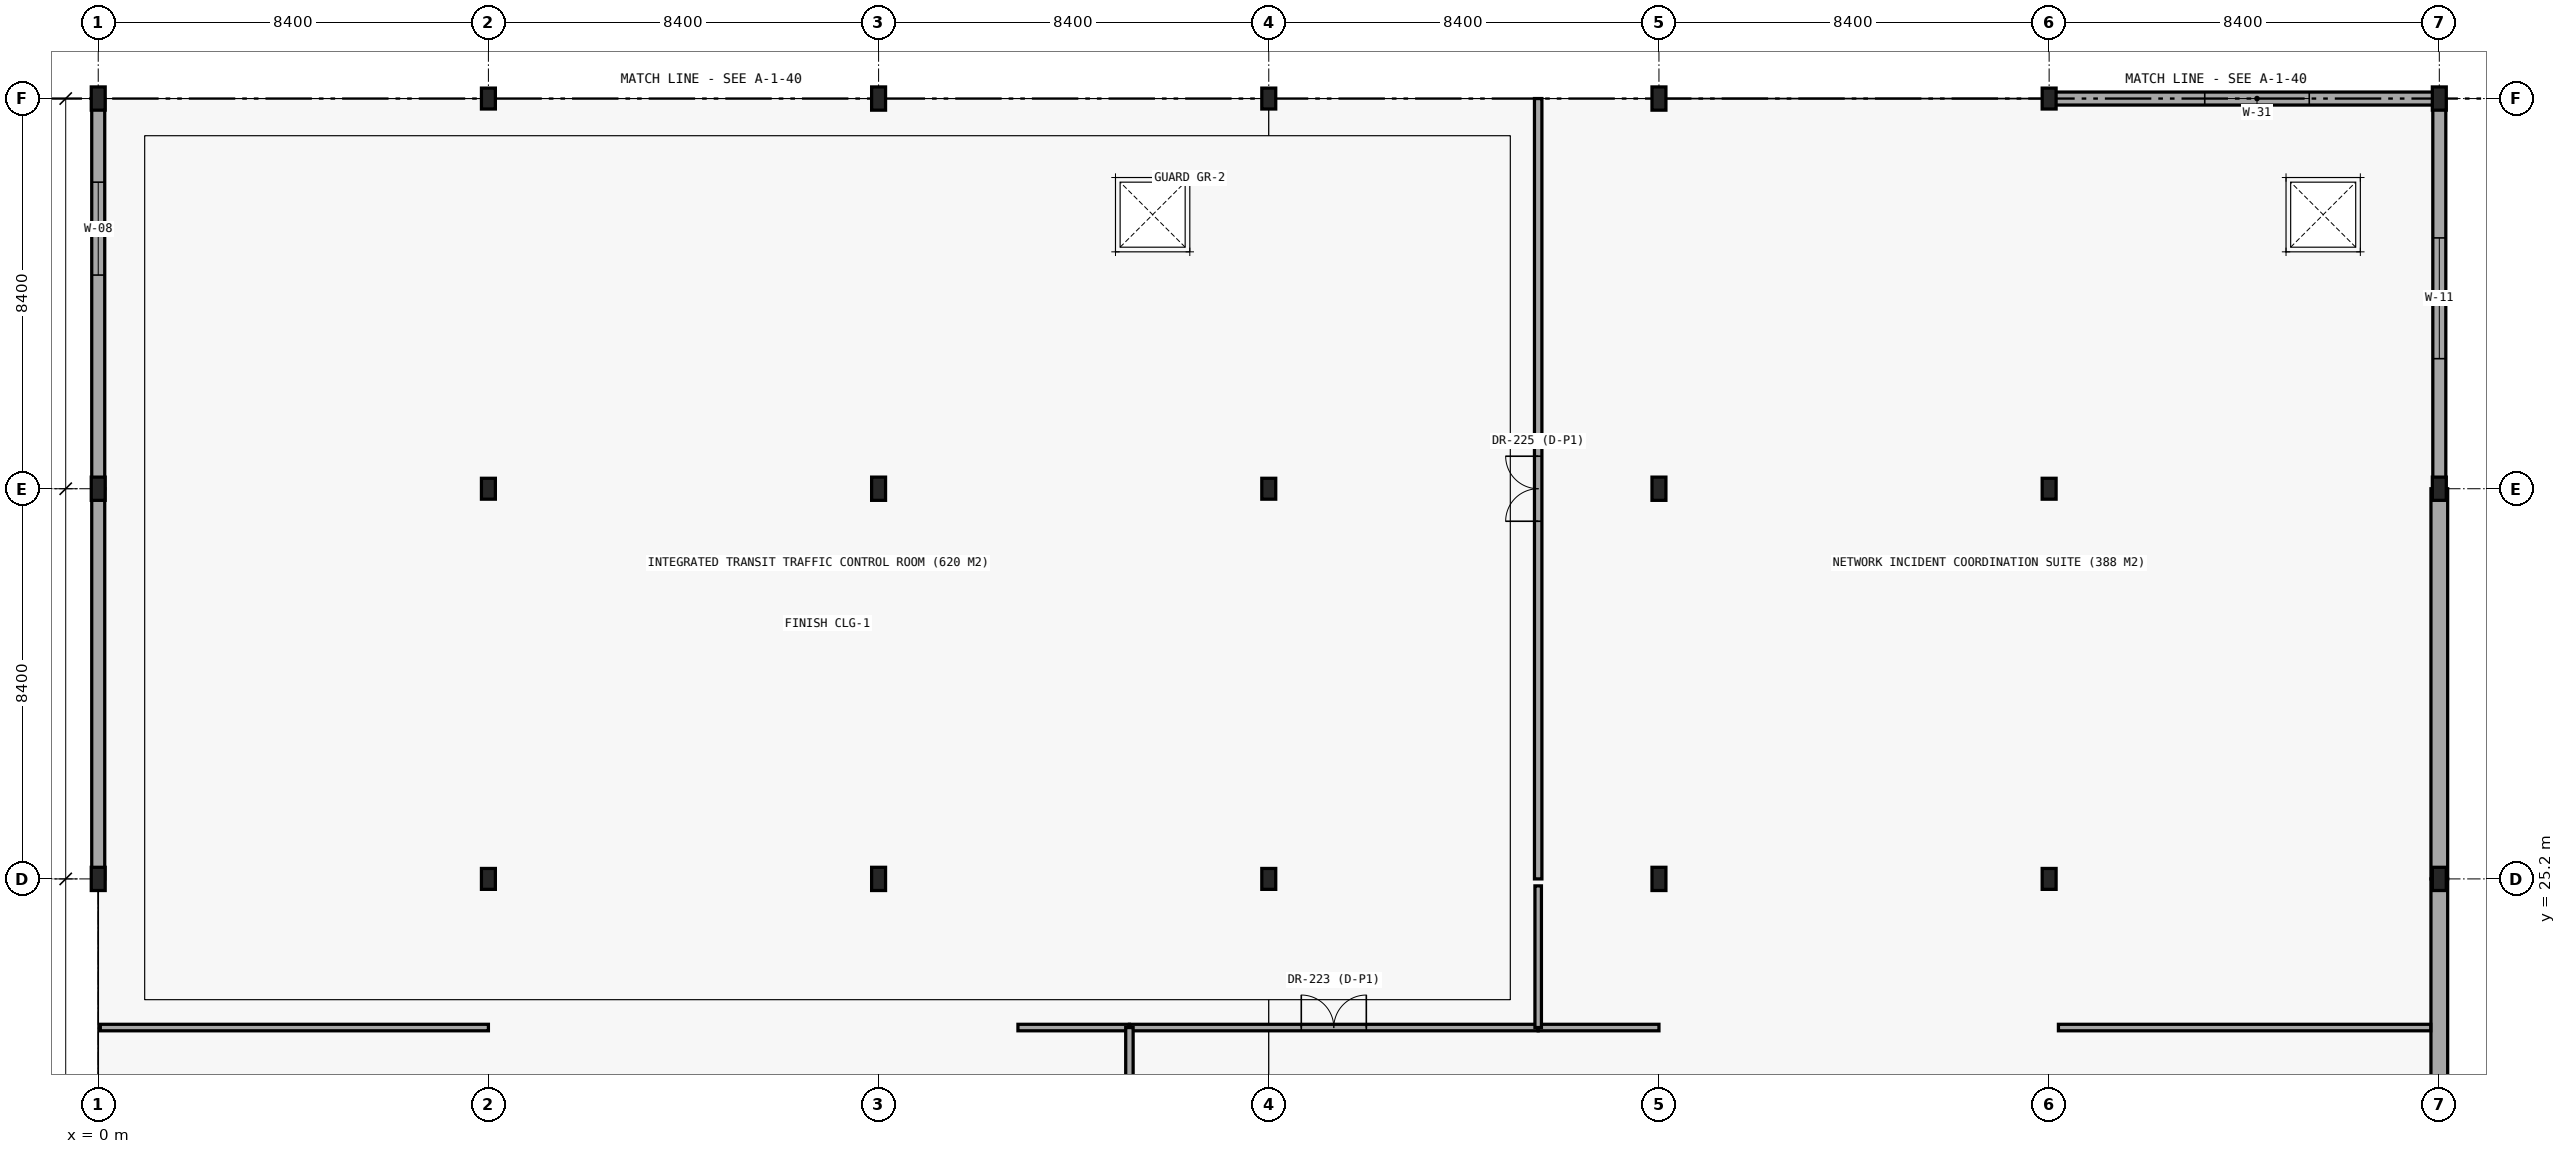
"""IFC4 building model, lengths in metres.
Left out: names, types, materials, properties, quantities, classifications, styles, units other than length and angle.
Written with IfcOpenShell. Run it as: python <this file> out.ifc"""

import sys

from ifc_helpers import new_model, si_unit, direction, frame, frame_2d, origin, origin_2d, place, context, subcontext, project, spatial, rectangle, i_section, extrude, element, fill, save


model = new_model("IFC4")
c1 = context("Model", 3, precision=1e-05, world=origin(), true_north=direction((0.0, 1.0)))
c2 = subcontext(c1, "Body", "Model", "MODEL_VIEW")
j1 = project(units=[si_unit("LENGTHUNIT", "METRE"), si_unit("PLANEANGLEUNIT", "RADIAN")], contexts=[c1])
p1 = place(None, origin())
s1 = spatial("IfcSite", under=j1, at=p1, CompositionType="ELEMENT")
p2 = place(p1, origin())
s2 = spatial("IfcBuilding", under=s1, at=p2, CompositionType="ELEMENT")
p3 = place(p2, frame((0.0, 0.0, 13.2)))
s3 = spatial("IfcBuildingStorey", under=s2, at=p3, CompositionType="ELEMENT", Elevation=13.2)
for number, where, z_axis, x_axis in (
    (1, (0.0, 25.2, 0.0), (0.0, 0.0, 1.0), (1.0, 0.0, 0.0)),
    (2, (0.0, 33.6, 0.0), (0.0, 0.0, 1.0), (1.0, 0.0, 0.0)),
    (3, (0.0, 42.0, 0.0), (0.0, 0.0, 1.0), (1.0, 0.0, 0.0)),
):
    element("IfcColumn", number, at=place(p3, frame(where, z_axis=z_axis, x_axis=x_axis)), inside=s3, PredefinedType="COLUMN", context=c2, shape_type="SweptSolid", body=[
        extrude(i_section(OverallWidth=0.3, OverallDepth=0.5, WebThickness=0.014, FlangeThickness=0.028, FilletRadius=0.027, at=origin_2d()), origin(), (0.0, 0.0, 1.0), 4.2),
    ])
for number, where, z_axis, x_axis in (
    (4, (8.4, 25.2, 0.0), (0.0, 0.0, 1.0), (1.0, 0.0, 0.0)),
    (5, (8.4, 33.6, 0.0), (0.0, 0.0, 1.0), (1.0, 0.0, 0.0)),
    (6, (8.4, 42.0, 0.0), (0.0, 0.0, 1.0), (1.0, 0.0, 0.0)),
):
    element("IfcColumn", number, at=place(p3, frame(where, z_axis=z_axis, x_axis=x_axis)), inside=s3, PredefinedType="COLUMN", context=c2, shape_type="SweptSolid", body=[
        extrude(i_section(OverallWidth=0.3, OverallDepth=0.45, WebThickness=0.014, FlangeThickness=0.026, FilletRadius=0.027, at=origin_2d()), origin(), (0.0, 0.0, 1.0), 4.2),
    ])
for number, where, z_axis, x_axis in (
    (7, (16.8, 25.2, 0.0), (0.0, 0.0, 1.0), (1.0, 0.0, 0.0)),
    (8, (16.8, 33.6, 0.0), (0.0, 0.0, 1.0), (1.0, 0.0, 0.0)),
    (9, (16.8, 42.0, 0.0), (0.0, 0.0, 1.0), (1.0, 0.0, 0.0)),
):
    element("IfcColumn", number, at=place(p3, frame(where, z_axis=z_axis, x_axis=x_axis)), inside=s3, PredefinedType="COLUMN", context=c2, shape_type="SweptSolid", body=[
        extrude(i_section(OverallWidth=0.3, OverallDepth=0.5, WebThickness=0.014, FlangeThickness=0.028, FilletRadius=0.027, at=origin_2d()), origin(), (0.0, 0.0, 1.0), 4.2),
    ])
for number, where, z_axis, x_axis in (
    (10, (25.2, 25.2, 0.0), (0.0, 0.0, 1.0), (1.0, 0.0, 0.0)),
    (11, (25.2, 33.6, 0.0), (0.0, 0.0, 1.0), (1.0, 0.0, 0.0)),
    (12, (25.2, 42.0, 0.0), (0.0, 0.0, 1.0), (1.0, 0.0, 0.0)),
):
    element("IfcColumn", number, at=place(p3, frame(where, z_axis=z_axis, x_axis=x_axis)), inside=s3, PredefinedType="COLUMN", context=c2, shape_type="SweptSolid", body=[
        extrude(i_section(OverallWidth=0.3, OverallDepth=0.45, WebThickness=0.014, FlangeThickness=0.026, FilletRadius=0.027, at=origin_2d()), origin(), (0.0, 0.0, 1.0), 4.2),
    ])
for number, where, z_axis, x_axis in (
    (13, (33.6, 25.2, 0.0), (0.0, 0.0, 1.0), (1.0, 0.0, 0.0)),
    (14, (33.6, 33.6, 0.0), (0.0, 0.0, 1.0), (1.0, 0.0, 0.0)),
    (15, (33.6, 42.0, 0.0), (0.0, 0.0, 1.0), (1.0, 0.0, 0.0)),
):
    element("IfcColumn", number, at=place(p3, frame(where, z_axis=z_axis, x_axis=x_axis)), inside=s3, PredefinedType="COLUMN", context=c2, shape_type="SweptSolid", body=[
        extrude(i_section(OverallWidth=0.3, OverallDepth=0.5, WebThickness=0.014, FlangeThickness=0.028, FilletRadius=0.027, at=origin_2d()), origin(), (0.0, 0.0, 1.0), 4.2),
    ])
for number, where, z_axis, x_axis in (
    (16, (42.0, 25.2, 0.0), (0.0, 0.0, 1.0), (1.0, 0.0, 0.0)),
    (17, (42.0, 33.6, 0.0), (0.0, 0.0, 1.0), (1.0, 0.0, 0.0)),
    (18, (42.0, 42.0, 0.0), (0.0, 0.0, 1.0), (1.0, 0.0, 0.0)),
):
    element("IfcColumn", number, at=place(p3, frame(where, z_axis=z_axis, x_axis=x_axis)), inside=s3, PredefinedType="COLUMN", context=c2, shape_type="SweptSolid", body=[
        extrude(i_section(OverallWidth=0.3, OverallDepth=0.45, WebThickness=0.014, FlangeThickness=0.026, FilletRadius=0.027, at=origin_2d()), origin(), (0.0, 0.0, 1.0), 4.2),
    ])
for number, where, z_axis, x_axis in (
    (19, (50.4, 25.2, 0.0), (0.0, 0.0, 1.0), (1.0, 0.0, 0.0)),
    (20, (50.4, 33.6, 0.0), (0.0, 0.0, 1.0), (1.0, 0.0, 0.0)),
    (21, (50.4, 42.0, 0.0), (0.0, 0.0, 1.0), (1.0, 0.0, 0.0)),
):
    element("IfcColumn", number, at=place(p3, frame(where, z_axis=z_axis, x_axis=x_axis)), inside=s3, PredefinedType="COLUMN", context=c2, shape_type="SweptSolid", body=[
        extrude(i_section(OverallWidth=0.3, OverallDepth=0.5, WebThickness=0.014, FlangeThickness=0.028, FilletRadius=0.027, at=origin_2d()), origin(), (0.0, 0.0, 1.0), 4.2),
    ])
p4 = place(p3, frame((0.0, 33.6, 0.0), z_axis=(0.0, 0.0, 1.0), x_axis=(0.0, -1.0, 0.0)))
e22 = element("IfcWall", 22, at=p4, inside=s3, PredefinedType="STANDARD", context=c2, shape_type="SweptSolid", body=[
    extrude(rectangle(XDim=8.4, YDim=0.28, at=frame_2d((4.2, 0.0))), origin(), (0.0, 0.0, 1.0), 3.62),
])
p5 = place(p3, frame((0.0, 42.0, 0.0), z_axis=(0.0, 0.0, 1.0), x_axis=(0.0, -1.0, 0.0)))
e23 = element("IfcWall", 23, at=p5, inside=s3, PredefinedType="STANDARD", context=c2, shape_type="SweptSolid", body=[
    extrude(rectangle(XDim=8.4, YDim=0.28, at=frame_2d((4.2, 0.0))), origin(), (0.0, 0.0, 1.0), 3.62),
])
p6 = place(p5, frame((1.8, 0.0, 0.85)))
e24 = element("IfcOpeningElement", 24, at=p6, cuts=e23, PredefinedType="OPENING", context=c2, shape_type="SweptSolid", body=[
    extrude(rectangle(XDim=2.0, YDim=2.2, at=frame_2d((1.0, 1.1))), frame((0.0, 0.15, 0.0), z_axis=(0.0, -1.0, 0.0), x_axis=(1.0, 0.0, 0.0)), (0.0, 0.0, 1.0), 0.3),
])
p7 = place(p3, frame((50.4, 42.0, 0.0), z_axis=(0.0, 0.0, 1.0), x_axis=(-1.0, 0.0, 0.0)))
e25 = element("IfcWall", 25, at=p7, inside=s3, PredefinedType="STANDARD", context=c2, shape_type="SweptSolid", body=[
    extrude(rectangle(XDim=8.4, YDim=0.28, at=frame_2d((4.2, 0.0))), origin(), (0.0, 0.0, 1.0), 3.62),
])
p8 = place(p7, frame((2.8, 0.0, 0.85)))
e26 = element("IfcOpeningElement", 26, at=p8, cuts=e25, PredefinedType="OPENING", context=c2, shape_type="SweptSolid", body=[
    extrude(rectangle(XDim=2.25, YDim=2.55, at=frame_2d((1.125, 1.275))), frame((0.0, 0.15, 0.0), z_axis=(0.0, -1.0, 0.0), x_axis=(1.0, 0.0, 0.0)), (0.0, 0.0, 1.0), 0.3),
])
p9 = place(p3, frame((50.4, 16.8, 0.0), z_axis=(0.0, 0.0, 1.0), x_axis=(0.0, 1.0, 0.0)))
e27 = element("IfcWall", 27, at=p9, inside=s3, PredefinedType="STANDARD", context=c2, shape_type="SweptSolid", body=[
    extrude(rectangle(XDim=8.4, YDim=0.36, at=frame_2d((4.2, 0.0))), origin(), (0.0, 0.0, 1.0), 3.62),
])
p10 = place(p3, frame((50.4, 25.2, 0.0), z_axis=(0.0, 0.0, 1.0), x_axis=(0.0, 1.0, 0.0)))
e28 = element("IfcWall", 28, at=p10, inside=s3, PredefinedType="STANDARD", context=c2, shape_type="SweptSolid", body=[
    extrude(rectangle(XDim=8.4, YDim=0.36, at=frame_2d((4.2, 0.0))), origin(), (0.0, 0.0, 1.0), 3.62),
])
p11 = place(p3, frame((50.4, 33.6, 0.0), z_axis=(0.0, 0.0, 1.0), x_axis=(0.0, 1.0, 0.0)))
e29 = element("IfcWall", 29, at=p11, inside=s3, PredefinedType="STANDARD", context=c2, shape_type="SweptSolid", body=[
    extrude(rectangle(XDim=8.4, YDim=0.28, at=frame_2d((4.2, 0.0))), origin(), (0.0, 0.0, 1.0), 3.62),
])
p12 = place(p11, frame((2.8, 0.0, 0.7)))
e30 = element("IfcOpeningElement", 30, at=p12, cuts=e29, PredefinedType="OPENING", context=c2, shape_type="SweptSolid", body=[
    extrude(rectangle(XDim=2.6, YDim=2.4, at=frame_2d((1.3, 1.2))), frame((0.0, 0.15, 0.0), z_axis=(0.0, -1.0, 0.0), x_axis=(1.0, 0.0, 0.0)), (0.0, 0.0, 1.0), 0.3),
])
p13 = place(p3, frame((0.045, 22.0, 0.0), z_axis=(0.0, 0.0, 1.0), x_axis=(1.0, 0.0, 0.0)))
e31 = element("IfcWall", 31, at=p13, inside=s3, PredefinedType="PARTITIONING", context=c2, shape_type="SweptSolid", body=[
    extrude(rectangle(XDim=8.355, YDim=0.14, at=frame_2d((4.177, 0.0))), origin(), (0.0, 0.0, 1.0), 3.5),
])
p14 = place(p3, frame((19.8, 22.0, 0.0), z_axis=(0.0, 0.0, 1.0), x_axis=(1.0, 0.0, 0.0)))
e32 = element("IfcWall", 32, at=p14, inside=s3, PredefinedType="PARTITIONING", context=c2, shape_type="SweptSolid", body=[
    extrude(rectangle(XDim=2.4, YDim=0.14, at=frame_2d((1.2, 0.0))), origin(), (0.0, 0.0, 1.0), 3.5),
])
p15 = place(p3, frame((22.2, 22.0, 0.0), z_axis=(0.0, 0.0, 1.0), x_axis=(1.0, 0.0, 0.0)))
e33 = element("IfcWall", 33, at=p15, inside=s3, PredefinedType="PARTITIONING", context=c2, shape_type="SweptSolid", body=[
    extrude(rectangle(XDim=8.8, YDim=0.14, at=frame_2d((4.4, 0.0))), origin(), (0.0, 0.0, 1.0), 3.5),
])
p16 = place(p15, frame((3.7, 0.0, 0.0)))
e34 = element("IfcOpeningElement", 34, at=p16, cuts=e33, PredefinedType="OPENING", context=c2, shape_type="SweptSolid", body=[
    extrude(rectangle(XDim=1.4, YDim=2.25, at=frame_2d((0.7, 1.125))), frame((0.0, 0.08, 0.0), z_axis=(0.0, -1.0, 0.0), x_axis=(1.0, 0.0, 0.0)), (0.0, 0.0, 1.0), 0.16),
])
p17 = place(p3, frame((31.0, 22.0, 0.0), z_axis=(0.0, 0.0, 1.0), x_axis=(1.0, 0.0, 0.0)))
e35 = element("IfcWall", 35, at=p17, inside=s3, PredefinedType="PARTITIONING", context=c2, shape_type="SweptSolid", body=[
    extrude(rectangle(XDim=2.6, YDim=0.14, at=frame_2d((1.3, 0.0))), origin(), (0.0, 0.0, 1.0), 3.5),
])
p18 = place(p3, frame((42.2, 22.0, 0.0), z_axis=(0.0, 0.0, 1.0), x_axis=(1.0, 0.0, 0.0)))
e36 = element("IfcWall", 36, at=p18, inside=s3, PredefinedType="PARTITIONING", context=c2, shape_type="SweptSolid", body=[
    extrude(rectangle(XDim=8.015, YDim=0.14, at=frame_2d((4.008, 0.0))), origin(), (0.0, 0.0, 1.0), 3.5),
])
p19 = place(p3, frame((22.2, 5.4, 0.0), z_axis=(0.0, 0.0, 1.0), x_axis=(0.0, 1.0, 0.0)))
e37 = element("IfcWall", 37, at=p19, inside=s3, PredefinedType="PARTITIONING", context=c2, shape_type="SweptSolid", body=[
    extrude(rectangle(XDim=16.6, YDim=0.16, at=frame_2d((8.3, 0.0))), origin(), (0.0, 0.0, 1.0), 3.5),
])
p20 = place(p19, frame((4.72, 0.0, 0.0)))
e38 = element("IfcOpeningElement", 38, at=p20, cuts=e37, PredefinedType="OPENING", context=c2, shape_type="SweptSolid", body=[
    extrude(rectangle(XDim=1.0, YDim=2.15, at=frame_2d((0.5, 1.075))), frame((0.0, 0.09, 0.0), z_axis=(0.0, -1.0, 0.0), x_axis=(1.0, 0.0, 0.0)), (0.0, 0.0, 1.0), 0.18),
])
p21 = place(p3, frame((31.0, 22.0, 0.0), z_axis=(0.0, 0.0, 1.0), x_axis=(0.0, 1.0, 0.0)))
e39 = element("IfcWall", 39, at=p21, inside=s3, PredefinedType="PARTITIONING", context=c2, shape_type="SweptSolid", body=[
    extrude(rectangle(XDim=3.05, YDim=0.14, at=frame_2d((1.525, 0.0))), origin(), (0.0, 0.0, 1.0), 3.5),
])
p22 = place(p3, frame((31.0, 25.2, 0.0), z_axis=(0.0, 0.0, 1.0), x_axis=(0.0, 1.0, 0.0)))
e40 = element("IfcWall", 40, at=p22, inside=s3, PredefinedType="PARTITIONING", context=c2, shape_type="SweptSolid", body=[
    extrude(rectangle(XDim=16.8, YDim=0.16, at=frame_2d((8.4, 0.0))), origin(), (0.0, 0.0, 1.0), 3.5),
])
p23 = place(p22, frame((7.7, 0.0, 0.0)))
e41 = element("IfcOpeningElement", 41, at=p23, cuts=e40, PredefinedType="OPENING", context=c2, shape_type="SweptSolid", body=[
    extrude(rectangle(XDim=1.4, YDim=2.25, at=frame_2d((0.7, 1.125))), frame((0.0, 0.09, 0.0), z_axis=(0.0, -1.0, 0.0), x_axis=(1.0, 0.0, 0.0)), (0.0, 0.0, 1.0), 0.18),
])
p24 = place(p6, origin())
e42 = element("IfcWindow", 42, at=p24, inside=s3, PartitioningType="SINGLE_PANEL", PredefinedType="WINDOW", context=c2, shape_type="SweptSolid", body=[
    extrude(rectangle(XDim=2.0, YDim=2.2, at=frame_2d((1.0, 1.1))), frame((0.0, 0.03, 0.0), z_axis=(0.0, -1.0, 0.0), x_axis=(1.0, 0.0, 0.0)), (0.0, 0.0, 1.0), 0.06),
])
fill(e24, e42)
p25 = place(p8, origin())
e43 = element("IfcWindow", 43, at=p25, inside=s3, PartitioningType="SINGLE_PANEL", PredefinedType="WINDOW", context=c2, shape_type="SweptSolid", body=[
    extrude(rectangle(XDim=2.25, YDim=2.55, at=frame_2d((1.125, 1.275))), frame((0.0, 0.03, 0.0), z_axis=(0.0, -1.0, 0.0), x_axis=(1.0, 0.0, 0.0)), (0.0, 0.0, 1.0), 0.06),
])
fill(e26, e43)
p26 = place(p12, origin())
e44 = element("IfcWindow", 44, at=p26, inside=s3, PartitioningType="SINGLE_PANEL", PredefinedType="WINDOW", context=c2, shape_type="SweptSolid", body=[
    extrude(rectangle(XDim=2.6, YDim=2.4, at=frame_2d((1.3, 1.2))), frame((0.0, 0.03, 0.0), z_axis=(0.0, -1.0, 0.0), x_axis=(1.0, 0.0, 0.0)), (0.0, 0.0, 1.0), 0.06),
])
fill(e30, e44)
p27 = place(p16, origin())
e45 = element("IfcDoor", 45, at=p27, inside=s3, OperationType="DOUBLE_DOOR_SINGLE_SWING", PredefinedType="DOOR", context=c2, shape_type="SweptSolid", body=[
    extrude(rectangle(XDim=1.4, YDim=2.25, at=frame_2d((0.7, 1.125))), frame((0.0, 0.025, 0.0), z_axis=(0.0, -1.0, 0.0), x_axis=(1.0, 0.0, 0.0)), (0.0, 0.0, 1.0), 0.05),
])
fill(e34, e45)
p28 = place(p23, origin())
e46 = element("IfcDoor", 46, at=p28, inside=s3, OperationType="DOUBLE_DOOR_SINGLE_SWING", PredefinedType="DOOR", context=c2, shape_type="SweptSolid", body=[
    extrude(rectangle(XDim=1.4, YDim=2.25, at=frame_2d((0.7, 1.125))), frame((0.0, 0.025, 0.0), z_axis=(0.0, -1.0, 0.0), x_axis=(1.0, 0.0, 0.0)), (0.0, 0.0, 1.0), 0.05),
])
fill(e41, e46)
save(model, sys.argv[1])
